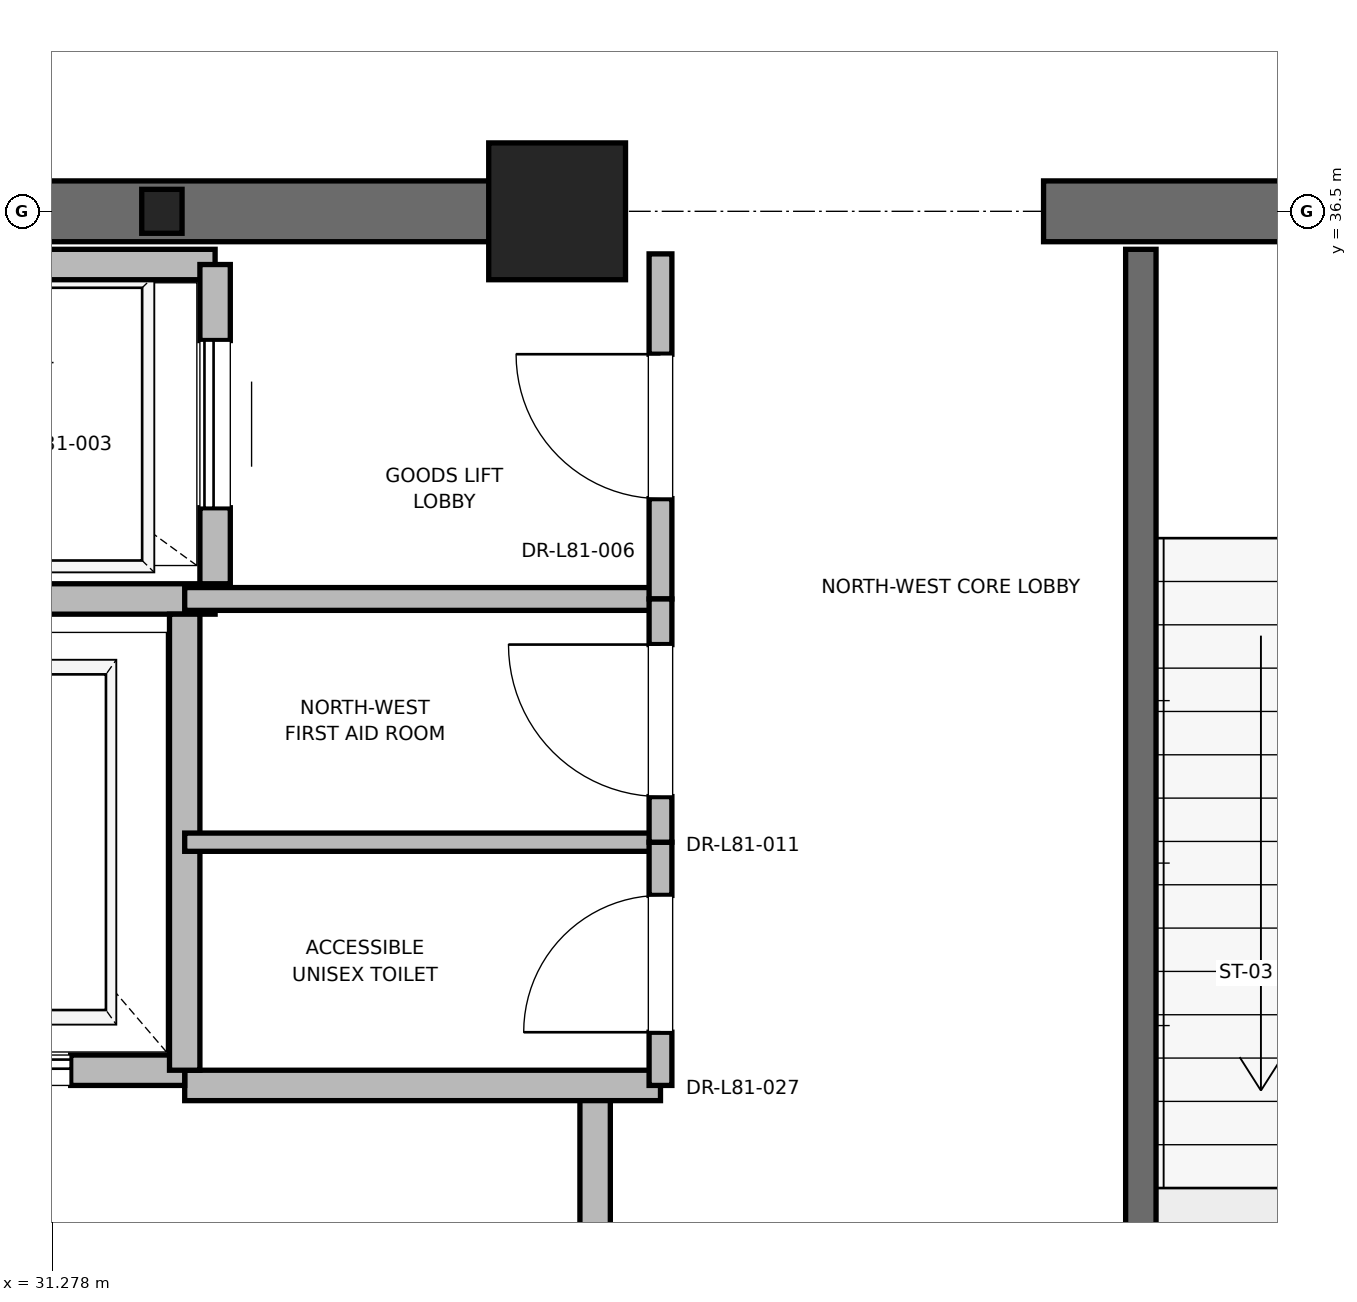
"""IFC4 building model, lengths in metres.
Left out: names, types, materials, properties, quantities, classifications, styles, units other than length and angle.
Written with IfcOpenShell. Run it as: python <this file> out.ifc"""

import sys

from ifc_helpers import new_model, si_unit, direction, frame, frame_2d, origin, origin_2d, place, context, subcontext, project, spatial, rectangle, i_section, extrude, element, fill, save


model = new_model("IFC4")
c1 = context("Model", 3, precision=1e-05, world=origin(), true_north=direction((0.0, 1.0)))
c2 = subcontext(c1, "Body", "Model", "MODEL_VIEW")
j1 = project(units=[si_unit("LENGTHUNIT", "METRE"), si_unit("PLANEANGLEUNIT", "RADIAN")], contexts=[c1])
p1 = place(None, origin())
s1 = spatial("IfcSite", under=j1, at=p1, CompositionType="ELEMENT")
p2 = place(p1, origin())
s2 = spatial("IfcBuilding", under=s1, at=p2, CompositionType="ELEMENT")
p3 = place(p2, frame((0.0, 0.0, 348.8)))
s3 = spatial("IfcBuildingStorey", under=s2, at=p3, CompositionType="ELEMENT", Elevation=348.8)
p4 = place(p3, frame((34.6, 36.5, 0.0), z_axis=(0.0, 0.0, 1.0), x_axis=(1.0, 0.0, 0.0)))
e1 = element("IfcColumn", 1, at=p4, inside=s3, PredefinedType="PILASTER", context=c2, shape_type="SweptSolid", body=[
    extrude(rectangle(XDim=0.9, YDim=0.9, at=origin_2d()), origin(), (0.0, 0.0, 1.0), 5.5),
])
p5 = place(p3, frame((32.0, 36.5, 0.0), z_axis=(0.0, 0.0, 1.0), x_axis=(1.0, 0.0, 0.0)))
e2 = element("IfcColumn", 2, at=p5, inside=s3, PredefinedType="COLUMN", context=c2, shape_type="SweptSolid", body=[
    extrude(i_section(OverallWidth=0.265, OverallDepth=0.289, WebThickness=0.019, FlangeThickness=0.032, FilletRadius=0.013, at=origin_2d()), origin(), (0.0, 0.0, 1.0), 5.5),
])
p6 = place(p3, frame((29.0, 36.5, 0.0), z_axis=(0.0, 0.0, 1.0), x_axis=(1.0, 0.0, 0.0)))
e3 = element("IfcWall", 3, at=p6, inside=s3, PredefinedType="SHEAR", context=c2, shape_type="SweptSolid", body=[
    extrude(rectangle(XDim=5.8, YDim=0.4, at=frame_2d((2.9, 0.0))), origin(), (0.0, 0.0, 1.0), 5.2),
])
p7 = place(p3, frame((37.8, 36.5, 0.0), z_axis=(0.0, 0.0, 1.0), x_axis=(1.0, 0.0, 0.0)))
e4 = element("IfcWall", 4, at=p7, inside=s3, PredefinedType="SHEAR", context=c2, shape_type="SweptSolid", body=[
    extrude(rectangle(XDim=4.4, YDim=0.4, at=frame_2d((2.2, 0.0))), origin(), (0.0, 0.0, 1.0), 5.2),
])
p8 = place(p7, frame((1.65, 0.0, 0.0)))
e5 = element("IfcOpeningElement", 5, at=p8, cuts=e4, PredefinedType="OPENING", context=c2, shape_type="SweptSolid", body=[
    extrude(rectangle(XDim=1.1, YDim=2.15, at=frame_2d((0.55, 1.075))), frame((0.0, 0.2, 0.0), z_axis=(0.0, -1.0, 0.0), x_axis=(1.0, 0.0, 0.0)), (0.0, 0.0, 1.0), 0.4),
])
p9 = place(p3, frame((38.44, 27.38, 0.0), z_axis=(0.0, 0.0, 1.0), x_axis=(0.0, 1.0, 0.0)))
e6 = element("IfcWall", 6, at=p9, inside=s3, PredefinedType="SOLIDWALL", context=c2, shape_type="SweptSolid", body=[
    extrude(rectangle(XDim=8.87, YDim=0.2, at=frame_2d((4.435, 0.0))), origin(), (0.0, 0.0, 1.0), 5.2),
])
p10 = place(p3, frame((34.85, 27.38, 0.0), z_axis=(0.0, 0.0, 1.0), x_axis=(0.0, 1.0, 0.0)))
e7 = element("IfcWall", 7, at=p10, inside=s3, PredefinedType="PARTITIONING", context=c2, shape_type="SweptSolid", body=[
    extrude(rectangle(XDim=3.37, YDim=0.2, at=frame_2d((1.685, 0.0))), origin(), (0.0, 0.0, 1.0), 5.2),
])
p11 = place(p10, frame((1.11, 0.0, 0.0)))
e8 = element("IfcOpeningElement", 8, at=p11, cuts=e7, PredefinedType="OPENING", context=c2, shape_type="SweptSolid", body=[
    extrude(rectangle(XDim=1.15, YDim=2.2, at=frame_2d((0.575, 1.1))), frame((0.0, 0.1, 0.0), z_axis=(0.0, -1.0, 0.0), x_axis=(1.0, 0.0, 0.0)), (0.0, 0.0, 1.0), 0.2),
])
p12 = place(p3, frame((32.15, 30.75, 0.0), z_axis=(0.0, 0.0, 1.0), x_axis=(1.0, 0.0, 0.0)))
e9 = element("IfcWall", 9, at=p12, inside=s3, PredefinedType="PARTITIONING", context=c2, shape_type="SweptSolid", body=[
    extrude(rectangle(XDim=3.13, YDim=0.2, at=frame_2d((1.565, 0.0))), origin(), (0.0, 0.0, 1.0), 5.2),
])
p13 = place(p3, frame((29.55, 30.85, 0.0), z_axis=(0.0, 0.0, 1.0), x_axis=(1.0, 0.0, 0.0)))
e10 = element("IfcWall", 10, at=p13, inside=s3, PredefinedType="SOLIDWALL", context=c2, shape_type="SweptSolid", body=[
    extrude(rectangle(XDim=2.6, YDim=0.2, at=frame_2d((1.3, 0.0))), origin(), (0.0, 0.0, 1.0), 4.28),
])
p14 = place(p13, frame((0.75, 0.0, 0.0)))
e11 = element("IfcOpeningElement", 11, at=p14, cuts=e10, PredefinedType="OPENING", context=c2, shape_type="SweptSolid", body=[
    extrude(rectangle(XDim=1.1, YDim=2.2, at=frame_2d((0.55, 1.1))), frame((0.0, 0.1, 0.0), z_axis=(0.0, -1.0, 0.0), x_axis=(1.0, 0.0, 0.0)), (0.0, 0.0, 1.0), 0.2),
])
p15 = place(p3, frame((29.55, 33.95, 0.0), z_axis=(0.0, 0.0, 1.0), x_axis=(1.0, 0.0, 0.0)))
e12 = element("IfcWall", 12, at=p15, inside=s3, PredefinedType="SOLIDWALL", context=c2, shape_type="SweptSolid", body=[
    extrude(rectangle(XDim=2.8, YDim=0.2, at=frame_2d((1.4, 0.0))), origin(), (0.0, 0.0, 1.0), 5.2),
])
p16 = place(p3, frame((32.15, 30.85, 0.0), z_axis=(0.0, 0.0, 1.0), x_axis=(0.0, 1.0, 0.0)))
e13 = element("IfcWall", 13, at=p16, inside=s3, PredefinedType="SOLIDWALL", context=c2, shape_type="SweptSolid", body=[
    extrude(rectangle(XDim=3.0, YDim=0.2, at=frame_2d((1.5, 0.0))), origin(), (0.0, 0.0, 1.0), 5.2),
])
p17 = place(p3, frame((32.35, 36.15, 0.0), z_axis=(0.0, 0.0, 1.0), x_axis=(-1.0, 0.0, 0.0)))
e14 = element("IfcWall", 14, at=p17, inside=s3, PredefinedType="SOLIDWALL", context=c2, shape_type="SweptSolid", body=[
    extrude(rectangle(XDim=2.8, YDim=0.2, at=frame_2d((1.4, 0.0))), origin(), (0.0, 0.0, 1.0), 4.635),
])
p18 = place(p3, frame((32.35, 34.05, 0.0), z_axis=(0.0, 0.0, 1.0), x_axis=(0.0, 1.0, 0.0)))
e15 = element("IfcWall", 15, at=p18, inside=s3, PredefinedType="SOLIDWALL", context=c2, shape_type="SweptSolid", body=[
    extrude(rectangle(XDim=2.1, YDim=0.2, at=frame_2d((1.05, 0.0))), origin(), (0.0, 0.0, 1.0), 5.2),
])
p19 = place(p18, frame((0.5, 0.0, 0.0)))
e16 = element("IfcOpeningElement", 16, at=p19, cuts=e15, PredefinedType="OPENING", context=c2, shape_type="SweptSolid", body=[
    extrude(rectangle(XDim=1.1, YDim=2.2, at=frame_2d((0.55, 1.1))), frame((0.0, 0.1, 0.0), z_axis=(0.0, -1.0, 0.0), x_axis=(1.0, 0.0, 0.0)), (0.0, 0.0, 1.0), 0.2),
])
p20 = place(p3, frame((32.15, 33.95, 0.0), z_axis=(0.0, 0.0, 1.0), x_axis=(1.0, 0.0, 0.0)))
e17 = element("IfcWall", 17, at=p20, inside=s3, PredefinedType="PARTITIONING", context=c2, shape_type="SweptSolid", body=[
    extrude(rectangle(XDim=3.13, YDim=0.15, at=frame_2d((1.565, 0.0))), origin(), (0.0, 0.0, 1.0), 2.85),
])
p21 = place(p3, frame((35.28, 33.95, 0.0), z_axis=(0.0, 0.0, 1.0), x_axis=(0.0, 1.0, 0.0)))
e18 = element("IfcWall", 18, at=p21, inside=s3, PredefinedType="PARTITIONING", context=c2, shape_type="SweptSolid", body=[
    extrude(rectangle(XDim=2.27, YDim=0.15, at=frame_2d((1.135, 0.0))), origin(), (0.0, 0.0, 1.0), 2.85),
])
p22 = place(p21, frame((0.66, 0.0, 0.0)))
e19 = element("IfcOpeningElement", 19, at=p22, cuts=e18, PredefinedType="OPENING", context=c2, shape_type="SweptSolid", body=[
    extrude(rectangle(XDim=0.95, YDim=2.15, at=frame_2d((0.475, 1.075))), frame((0.0, 0.075, 0.0), z_axis=(0.0, -1.0, 0.0), x_axis=(1.0, 0.0, 0.0)), (0.0, 0.0, 1.0), 0.15),
])
p23 = place(p3, frame((32.15, 32.35, 0.0), z_axis=(0.0, 0.0, 1.0), x_axis=(1.0, 0.0, 0.0)))
e20 = element("IfcWall", 20, at=p23, inside=s3, PredefinedType="PARTITIONING", context=c2, shape_type="SweptSolid", body=[
    extrude(rectangle(XDim=3.13, YDim=0.12, at=frame_2d((1.565, 0.0))), origin(), (0.0, 0.0, 1.0), 2.85),
])
p24 = place(p3, frame((35.28, 30.75, 0.0), z_axis=(0.0, 0.0, 1.0), x_axis=(0.0, 1.0, 0.0)))
e21 = element("IfcWall", 21, at=p24, inside=s3, PredefinedType="PARTITIONING", context=c2, shape_type="SweptSolid", body=[
    extrude(rectangle(XDim=1.6, YDim=0.15, at=frame_2d((0.8, 0.0))), origin(), (0.0, 0.0, 1.0), 2.85),
])
p25 = place(p24, frame((0.35, 0.0, 0.0)))
e22 = element("IfcOpeningElement", 22, at=p25, cuts=e21, PredefinedType="OPENING", context=c2, shape_type="SweptSolid", body=[
    extrude(rectangle(XDim=0.9, YDim=2.1, at=frame_2d((0.45, 1.05))), frame((0.0, 0.075, 0.0), z_axis=(0.0, -1.0, 0.0), x_axis=(1.0, 0.0, 0.0)), (0.0, 0.0, 1.0), 0.15),
])
p26 = place(p3, frame((35.28, 32.35, 0.0), z_axis=(0.0, 0.0, 1.0), x_axis=(0.0, 1.0, 0.0)))
e23 = element("IfcWall", 23, at=p26, inside=s3, PredefinedType="PARTITIONING", context=c2, shape_type="SweptSolid", body=[
    extrude(rectangle(XDim=1.6, YDim=0.15, at=frame_2d((0.8, 0.0))), origin(), (0.0, 0.0, 1.0), 2.85),
])
p27 = place(p26, frame((0.3, 0.0, 0.0)))
e24 = element("IfcOpeningElement", 24, at=p27, cuts=e23, PredefinedType="OPENING", context=c2, shape_type="SweptSolid", body=[
    extrude(rectangle(XDim=1.0, YDim=2.15, at=frame_2d((0.5, 1.075))), frame((0.0, 0.075, 0.0), z_axis=(0.0, -1.0, 0.0), x_axis=(1.0, 0.0, 0.0)), (0.0, 0.0, 1.0), 0.15),
])
p28 = place(p14, origin())
e25 = element("IfcDoor", 25, at=p28, inside=s3, OperationType="SLIDING_TO_RIGHT", PredefinedType="DOOR", context=c2, shape_type="SweptSolid", body=[
    extrude(rectangle(XDim=1.1, YDim=2.2, at=frame_2d((0.55, 1.1))), frame((0.0, 0.025, 0.0), z_axis=(0.0, -1.0, 0.0), x_axis=(1.0, 0.0, 0.0)), (0.0, 0.0, 1.0), 0.05),
])
fill(e11, e25)
p29 = place(p19, origin())
e26 = element("IfcDoor", 26, at=p29, inside=s3, OperationType="SLIDING_TO_RIGHT", PredefinedType="DOOR", context=c2, shape_type="SweptSolid", body=[
    extrude(rectangle(XDim=1.1, YDim=2.2, at=frame_2d((0.55, 1.1))), frame((0.0, 0.025, 0.0), z_axis=(0.0, -1.0, 0.0), x_axis=(1.0, 0.0, 0.0)), (0.0, 0.0, 1.0), 0.05),
])
fill(e16, e26)
p30 = place(p22, origin())
e27 = element("IfcDoor", 27, at=p30, inside=s3, OperationType="SINGLE_SWING_RIGHT", PredefinedType="DOOR", context=c2, shape_type="SweptSolid", body=[
    extrude(rectangle(XDim=0.95, YDim=2.15, at=frame_2d((0.475, 1.075))), frame((0.0, 0.025, 0.0), z_axis=(0.0, -1.0, 0.0), x_axis=(1.0, 0.0, 0.0)), (0.0, 0.0, 1.0), 0.05),
])
fill(e19, e27)
p31 = place(p25, origin())
e28 = element("IfcDoor", 28, at=p31, inside=s3, OperationType="SINGLE_SWING_LEFT", PredefinedType="DOOR", context=c2, shape_type="SweptSolid", body=[
    extrude(rectangle(XDim=0.9, YDim=2.1, at=frame_2d((0.45, 1.05))), frame((0.0, 0.025, 0.0), z_axis=(0.0, -1.0, 0.0), x_axis=(1.0, 0.0, 0.0)), (0.0, 0.0, 1.0), 0.05),
])
fill(e22, e28)
p32 = place(p27, origin())
e29 = element("IfcDoor", 29, at=p32, inside=s3, OperationType="SINGLE_SWING_RIGHT", PredefinedType="DOOR", context=c2, shape_type="SweptSolid", body=[
    extrude(rectangle(XDim=1.0, YDim=2.15, at=frame_2d((0.5, 1.075))), frame((0.0, 0.025, 0.0), z_axis=(0.0, -1.0, 0.0), x_axis=(1.0, 0.0, 0.0)), (0.0, 0.0, 1.0), 0.05),
])
fill(e24, e29)
save(model, sys.argv[1])
